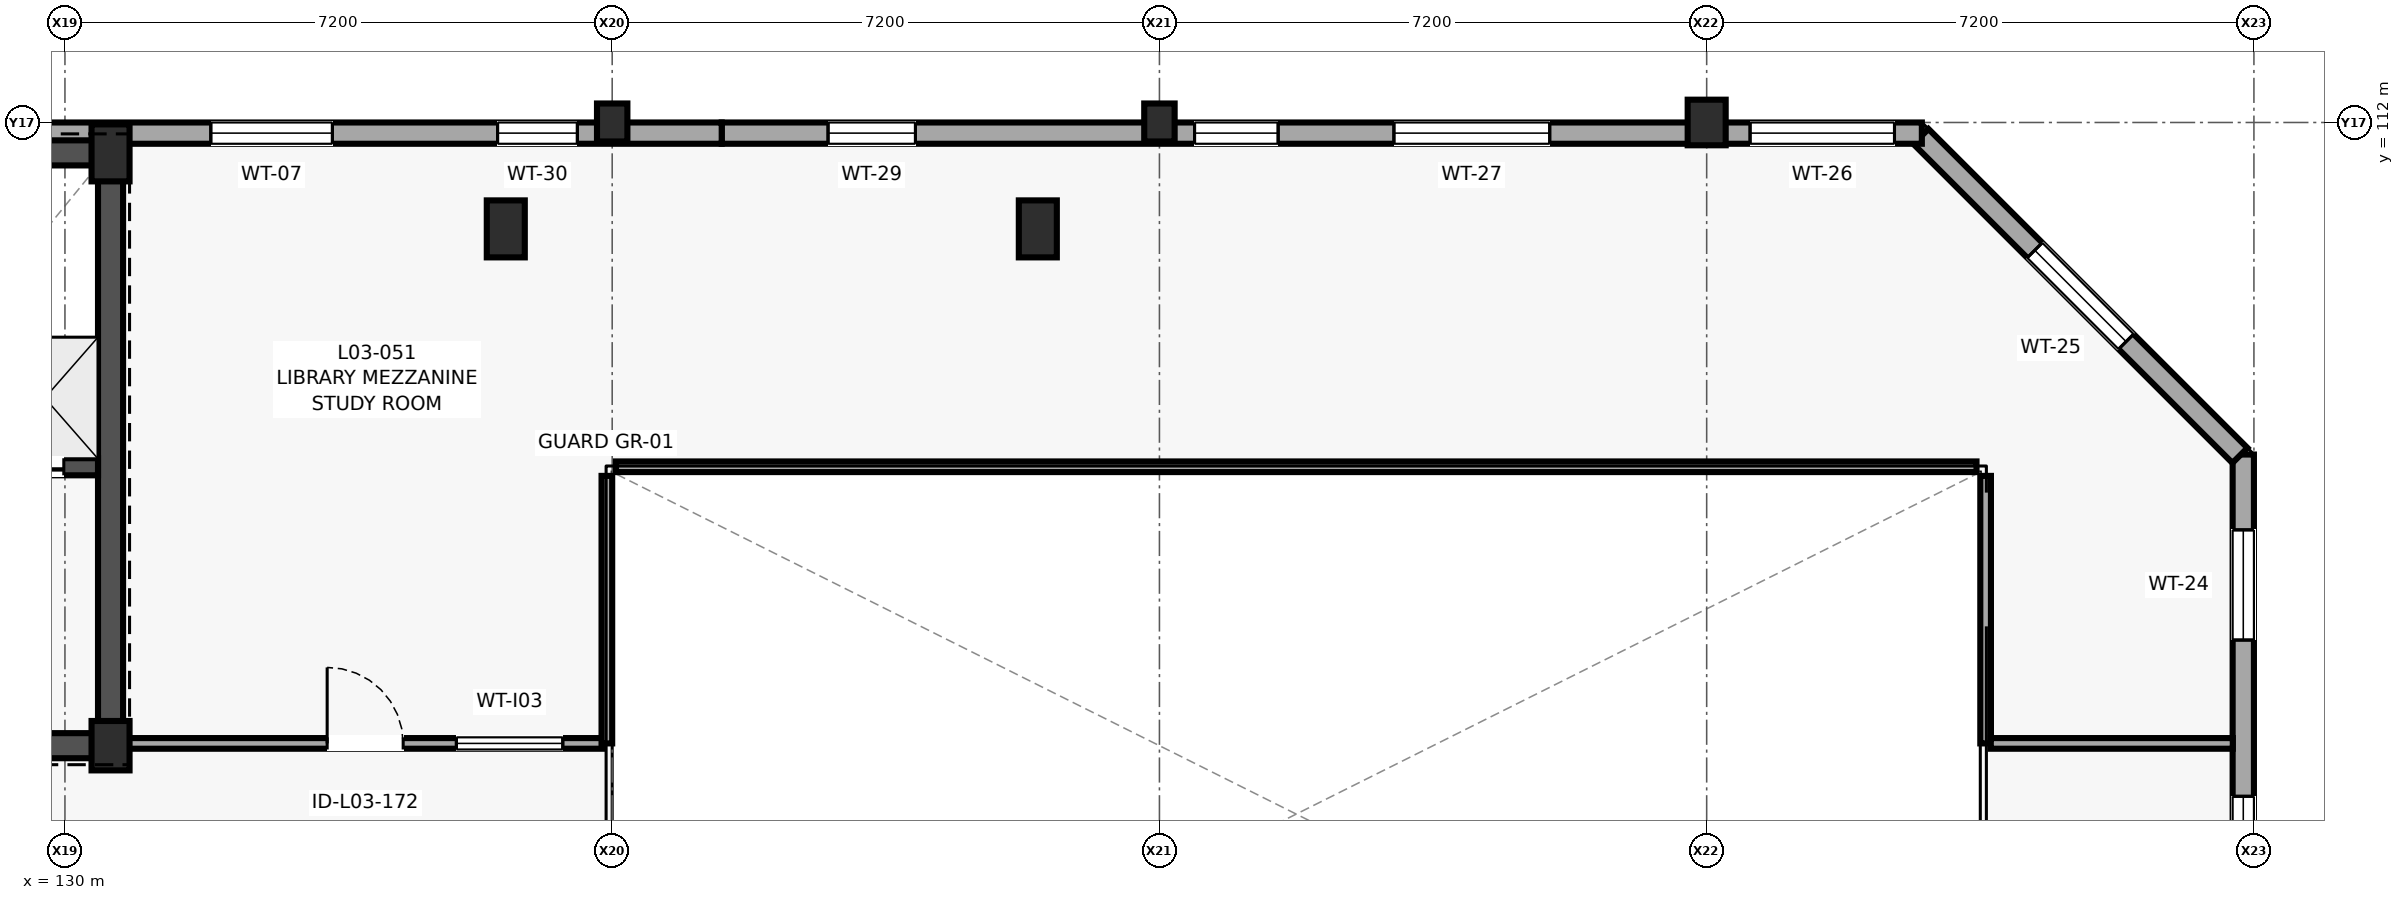
"""IFC4 building model, lengths in metres.
Left out: names, types, materials, properties, quantities, classifications, styles, units other than length and angle.
Written with IfcOpenShell. Run it as: python <this file> out.ifc"""

import sys

from ifc_helpers import new_model, si_unit, direction, frame, frame_2d, origin, origin_2d, place, context, subcontext, project, spatial, rectangle, extrude, element, fill, save


model = new_model("IFC4")
c1 = context("Model", 3, precision=1e-05, world=origin(), true_north=direction((0.0, 1.0)))
c2 = subcontext(c1, "Body", "Model", "MODEL_VIEW")
j1 = project(units=[si_unit("LENGTHUNIT", "METRE"), si_unit("PLANEANGLEUNIT", "RADIAN")], contexts=[c1])
p1 = place(None, origin())
s1 = spatial("IfcSite", under=j1, at=p1, CompositionType="ELEMENT")
p2 = place(p1, origin())
s2 = spatial("IfcBuilding", under=s1, at=p2, CompositionType="ELEMENT")
p3 = place(p2, frame((0.0, 0.0, 12.2)))
s3 = spatial("IfcBuildingStorey", under=s2, at=p3, CompositionType="ELEMENT", Elevation=12.2)
p4 = place(p3, frame((130.6, 103.8, 0.0), z_axis=(0.0, 0.0, 1.0), x_axis=(1.0, 0.0, 0.0)))
e1 = element("IfcColumn", 1, at=p4, inside=s3, PredefinedType="COLUMN", context=c2, shape_type="SweptSolid", body=[
    extrude(rectangle(XDim=0.5, YDim=0.65, at=origin_2d()), origin(), (0.0, 0.0, 1.0), 4.0),
])
for number, where, z_axis, x_axis in (
    (2, (130.6, 111.6, 0.0), (0.0, 0.0, 1.0), (1.0, 0.0, 0.0)),
    (3, (135.8, 110.6, 0.0), (0.0, 0.0, 1.0), (1.0, 0.0, 0.0)),
):
    element("IfcColumn", number, at=place(p3, frame(where, z_axis=z_axis, x_axis=x_axis)), inside=s3, PredefinedType="COLUMN", context=c2, shape_type="SweptSolid", body=[
        extrude(rectangle(XDim=0.5, YDim=0.75, at=origin_2d()), origin(), (0.0, 0.0, 1.0), 4.0),
    ])
p5 = place(p3, frame((137.2, 112.0, 0.0), z_axis=(0.0, 0.0, 1.0), x_axis=(1.0, 0.0, 0.0)))
e4 = element("IfcColumn", 4, at=p5, inside=s3, PredefinedType="PILASTER", context=c2, shape_type="SweptSolid", body=[
    extrude(rectangle(XDim=0.4, YDim=0.5, at=origin_2d()), origin(), (0.0, 0.0, 1.0), 4.0),
])
p6 = place(p3, frame((142.8, 110.6, 0.0), z_axis=(0.0, 0.0, 1.0), x_axis=(1.0, 0.0, 0.0)))
e5 = element("IfcColumn", 5, at=p6, inside=s3, PredefinedType="COLUMN", context=c2, shape_type="SweptSolid", body=[
    extrude(rectangle(XDim=0.5, YDim=0.75, at=origin_2d()), origin(), (0.0, 0.0, 1.0), 4.0),
])
p7 = place(p3, frame((144.4, 112.0, 0.0), z_axis=(0.0, 0.0, 1.0), x_axis=(1.0, 0.0, 0.0)))
e6 = element("IfcColumn", 6, at=p7, inside=s3, PredefinedType="PILASTER", context=c2, shape_type="SweptSolid", body=[
    extrude(rectangle(XDim=0.4, YDim=0.5, at=origin_2d()), origin(), (0.0, 0.0, 1.0), 4.0),
])
p8 = place(p3, frame((151.6, 112.0, 0.0), z_axis=(0.0, 0.0, 1.0), x_axis=(1.0, 0.0, 0.0)))
e7 = element("IfcColumn", 7, at=p8, inside=s3, PredefinedType="PILASTER", context=c2, shape_type="SweptSolid", body=[
    extrude(rectangle(XDim=0.5, YDim=0.6, at=origin_2d()), origin(), (0.0, 0.0, 1.0), 4.0),
])
p9 = place(p3, frame((158.66, 100.769, 0.0), z_axis=(0.0, 0.0, 1.0), x_axis=(0.0, 1.0, 0.0)))
e8 = element("IfcWall", 8, at=p9, inside=s3, PredefinedType="SOLIDWALL", context=c2, shape_type="SweptSolid", body=[
    extrude(rectangle(XDim=6.862, YDim=0.28, at=frame_2d((3.431, 0.0))), origin(), (0.0, 0.0, 1.0), 3.78),
])
p10 = place(p9, frame((1.065, 0.0, 1.05)))
e9 = element("IfcOpeningElement", 9, at=p10, cuts=e8, PredefinedType="OPENING", context=c2, shape_type="SweptSolid", body=[
    extrude(rectangle(XDim=1.3, YDim=1.6, at=frame_2d((0.65, 0.8))), frame((0.0, 0.15, 0.0), z_axis=(0.0, -1.0, 0.0), x_axis=(1.0, 0.0, 0.0)), (0.0, 0.0, 1.0), 0.3),
])
p11 = place(p9, frame((4.421, 0.0, 0.85)))
e10 = element("IfcOpeningElement", 10, at=p11, cuts=e8, PredefinedType="OPENING", context=c2, shape_type="SweptSolid", body=[
    extrude(rectangle(XDim=1.45, YDim=1.7, at=frame_2d((0.725, 0.85))), frame((0.0, 0.15, 0.0), z_axis=(0.0, -1.0, 0.0), x_axis=(1.0, 0.0, 0.0)), (0.0, 0.0, 1.0), 0.3),
])
p12 = place(p3, frame((158.616, 107.619, 0.0), z_axis=(0.0, 0.0, 1.0), x_axis=(-0.707106781187, 0.707106781187, 0.0)))
e11 = element("IfcWall", 11, at=p12, inside=s3, PredefinedType="SOLIDWALL", context=c2, shape_type="SweptSolid", body=[
    extrude(rectangle(XDim=5.936, YDim=0.28, at=frame_2d((2.968, 0.0))), origin(), (0.0, 0.0, 1.0), 3.78),
])
p13 = place(p12, frame((2.118, 0.0, 0.85)))
e12 = element("IfcOpeningElement", 12, at=p13, cuts=e11, PredefinedType="OPENING", context=c2, shape_type="SweptSolid", body=[
    extrude(rectangle(XDim=1.7, YDim=1.75, at=frame_2d((0.85, 0.875))), frame((0.0, 0.15, 0.0), z_axis=(0.0, -1.0, 0.0), x_axis=(1.0, 0.0, 0.0)), (0.0, 0.0, 1.0), 0.3),
])
p14 = place(p3, frame((154.431, 111.86, 0.0), z_axis=(0.0, 0.0, 1.0), x_axis=(-1.0, 0.0, 0.0)))
e13 = element("IfcWall", 13, at=p14, inside=s3, PredefinedType="SOLIDWALL", context=c2, shape_type="SweptSolid", body=[
    extrude(rectangle(XDim=15.79, YDim=0.28, at=frame_2d((7.895, 0.0))), origin(), (0.0, 0.0, 1.0), 3.01),
])
p15 = place(p14, frame((0.36, 0.0, 0.85)))
e14 = element("IfcOpeningElement", 14, at=p15, cuts=e13, PredefinedType="OPENING", context=c2, shape_type="SweptSolid", body=[
    extrude(rectangle(XDim=1.9, YDim=1.65, at=frame_2d((0.95, 0.825))), frame((0.0, 0.15, 0.0), z_axis=(0.0, -1.0, 0.0), x_axis=(1.0, 0.0, 0.0)), (0.0, 0.0, 1.0), 0.3),
])
p16 = place(p14, frame((4.896, 0.0, 1.05)))
e15 = element("IfcOpeningElement", 15, at=p16, cuts=e13, PredefinedType="OPENING", context=c2, shape_type="SweptSolid", body=[
    extrude(rectangle(XDim=2.05, YDim=1.55, at=frame_2d((1.025, 0.775))), frame((0.0, 0.15, 0.0), z_axis=(0.0, -1.0, 0.0), x_axis=(1.0, 0.0, 0.0)), (0.0, 0.0, 1.0), 0.3),
])
p17 = place(p14, frame((8.469, 0.0, 0.75)))
e16 = element("IfcOpeningElement", 16, at=p17, cuts=e13, PredefinedType="OPENING", context=c2, shape_type="SweptSolid", body=[
    extrude(rectangle(XDim=1.1, YDim=2.1, at=frame_2d((0.55, 1.05))), frame((0.0, 0.15, 0.0), z_axis=(0.0, -1.0, 0.0), x_axis=(1.0, 0.0, 0.0)), (0.0, 0.0, 1.0), 0.3),
])
p18 = place(p14, frame((13.241, 0.0, 1.05)))
e17 = element("IfcOpeningElement", 17, at=p18, cuts=e13, PredefinedType="OPENING", context=c2, shape_type="SweptSolid", body=[
    extrude(rectangle(XDim=1.15, YDim=1.4, at=frame_2d((0.575, 0.7))), frame((0.0, 0.15, 0.0), z_axis=(0.0, -1.0, 0.0), x_axis=(1.0, 0.0, 0.0)), (0.0, 0.0, 1.0), 0.3),
])
p19 = place(p3, frame((138.641, 111.86, 0.0), z_axis=(0.0, 0.0, 1.0), x_axis=(-1.0, 0.0, 0.0)))
e18 = element("IfcWall", 18, at=p19, inside=s3, PredefinedType="SOLIDWALL", context=c2, shape_type="SweptSolid", body=[
    extrude(rectangle(XDim=15.791, YDim=0.28, at=frame_2d((7.896, 0.0))), origin(), (0.0, 0.0, 1.0), 3.115),
])
p20 = place(p19, frame((1.899, 0.0, 1.05)))
e19 = element("IfcOpeningElement", 19, at=p20, cuts=e18, PredefinedType="OPENING", context=c2, shape_type="SweptSolid", body=[
    extrude(rectangle(XDim=1.05, YDim=1.3, at=frame_2d((0.525, 0.65))), frame((0.0, 0.15, 0.0), z_axis=(0.0, -1.0, 0.0), x_axis=(1.0, 0.0, 0.0)), (0.0, 0.0, 1.0), 0.3),
])
p21 = place(p19, frame((5.122, 0.0, 1.05)))
e20 = element("IfcOpeningElement", 20, at=p21, cuts=e18, PredefinedType="OPENING", context=c2, shape_type="SweptSolid", body=[
    extrude(rectangle(XDim=1.6, YDim=1.35, at=frame_2d((0.8, 0.675))), frame((0.0, 0.15, 0.0), z_axis=(0.0, -1.0, 0.0), x_axis=(1.0, 0.0, 0.0)), (0.0, 0.0, 1.0), 0.3),
])
p22 = place(p3, frame((123.235, 103.8, 0.0), z_axis=(0.0, 0.0, 1.0), x_axis=(1.0, 0.0, 0.0)))
e21 = element("IfcWall", 21, at=p22, inside=s3, PredefinedType="SHEAR", context=c2, shape_type="SweptSolid", body=[
    extrude(rectangle(XDim=7.53, YDim=0.33, at=frame_2d((3.765, 0.0))), origin(), (0.0, 0.0, 1.0), 3.78),
])
p23 = place(p22, frame((5.015, 0.0, 0.0)))
e22 = element("IfcOpeningElement", 22, at=p23, cuts=e21, PredefinedType="OPENING", context=c2, shape_type="SweptSolid", body=[
    extrude(rectangle(XDim=1.05, YDim=2.15, at=frame_2d((0.525, 1.075))), frame((0.0, 0.175, 0.0), z_axis=(0.0, -1.0, 0.0), x_axis=(1.0, 0.0, 0.0)), (0.0, 0.0, 1.0), 0.35),
])
p24 = place(p22, frame((1.565, 0.0, 0.0)))
e23 = element("IfcOpeningElement", 23, at=p24, cuts=e21, PredefinedType="OPENING", context=c2, shape_type="SweptSolid", body=[
    extrude(rectangle(XDim=1.1, YDim=2.15, at=frame_2d((0.55, 1.075))), frame((0.0, 0.175, 0.0), z_axis=(0.0, -1.0, 0.0), x_axis=(1.0, 0.0, 0.0)), (0.0, 0.0, 1.0), 0.35),
])
p25 = place(p3, frame((123.235, 111.6, 0.0), z_axis=(0.0, 0.0, 1.0), x_axis=(1.0, 0.0, 0.0)))
e24 = element("IfcWall", 24, at=p25, inside=s3, PredefinedType="SHEAR", context=c2, shape_type="SweptSolid", body=[
    extrude(rectangle(XDim=7.53, YDim=0.33, at=frame_2d((3.765, 0.0))), origin(), (0.0, 0.0, 1.0), 3.78),
])
p26 = place(p3, frame((130.6, 103.965, 0.0), z_axis=(0.0, 0.0, 1.0), x_axis=(0.0, 1.0, 0.0)))
e25 = element("IfcWall", 25, at=p26, inside=s3, PredefinedType="SHEAR", context=c2, shape_type="SweptSolid", body=[
    extrude(rectangle(XDim=7.47, YDim=0.33, at=frame_2d((3.735, 0.0))), origin(), (0.0, 0.0, 1.0), 3.78),
])
p27 = place(p3, frame((127.285, 107.47, 0.0), z_axis=(0.0, 0.0, 1.0), x_axis=(1.0, 0.0, 0.0)))
e26 = element("IfcWall", 26, at=p27, inside=s3, PredefinedType="SHEAR", context=c2, shape_type="SweptSolid", body=[
    extrude(rectangle(XDim=3.15, YDim=0.225, at=frame_2d((1.575, 0.0))), origin(), (0.0, 0.0, 1.0), 3.78),
])
p28 = place(p27, frame((0.2, 0.0, 0.0)))
e27 = element("IfcOpeningElement", 27, at=p28, cuts=e26, PredefinedType="OPENING", context=c2, shape_type="SweptSolid", body=[
    extrude(rectangle(XDim=0.95, YDim=2.15, at=frame_2d((0.475, 1.075))), frame((0.0, 0.123, 0.0), z_axis=(0.0, -1.0, 0.0), x_axis=(1.0, 0.0, 0.0)), (0.0, 0.0, 1.0), 0.245),
])
p29 = place(p27, frame((1.65, 0.0, 0.0)))
e28 = element("IfcOpeningElement", 28, at=p29, cuts=e26, PredefinedType="OPENING", context=c2, shape_type="SweptSolid", body=[
    extrude(rectangle(XDim=1.05, YDim=2.2, at=frame_2d((0.525, 1.1))), frame((0.0, 0.123, 0.0), z_axis=(0.0, -1.0, 0.0), x_axis=(1.0, 0.0, 0.0)), (0.0, 0.0, 1.0), 0.245),
])
p30 = place(p3, frame((155.27, 107.35, 0.0), z_axis=(0.0, 0.0, 1.0), x_axis=(0.0, -1.0, 0.0)))
e29 = element("IfcWall", 29, at=p30, inside=s3, PredefinedType="PARTITIONING", context=c2, shape_type="SweptSolid", body=[
    extrude(rectangle(XDim=3.52, YDim=0.14, at=frame_2d((1.76, 0.0))), origin(), (0.0, 0.0, 1.0), 3.715),
])
p31 = place(p3, frame((155.338, 103.83, 0.0), z_axis=(0.0, 0.0, 1.0), x_axis=(1.0, 0.0, 0.0)))
e30 = element("IfcWall", 30, at=p31, inside=s3, PredefinedType="PARTITIONING", context=c2, shape_type="SweptSolid", body=[
    extrude(rectangle(XDim=3.184, YDim=0.14, at=frame_2d((1.592, 0.0))), origin(), (0.0, 0.0, 1.0), 3.715),
])
p32 = place(p3, frame((130.83, 103.83, 0.0), z_axis=(0.0, 0.0, 1.0), x_axis=(1.0, 0.0, 0.0)))
e31 = element("IfcWall", 31, at=p32, inside=s3, PredefinedType="PARTITIONING", context=c2, shape_type="SweptSolid", body=[
    extrude(rectangle(XDim=6.24, YDim=0.14, at=frame_2d((3.12, 0.0))), origin(), (0.0, 0.0, 1.0), 3.715),
])
p33 = place(p32, frame((2.62, 0.0, 0.0)))
e32 = element("IfcOpeningElement", 32, at=p33, cuts=e31, PredefinedType="OPENING", context=c2, shape_type="SweptSolid", body=[
    extrude(rectangle(XDim=1.0, YDim=2.1, at=frame_2d((0.5, 1.05))), frame((0.0, 0.08, 0.0), z_axis=(0.0, -1.0, 0.0), x_axis=(1.0, 0.0, 0.0)), (0.0, 0.0, 1.0), 0.16),
])
p34 = place(p32, frame((4.32, 0.0, 1.05)))
e33 = element("IfcOpeningElement", 33, at=p34, cuts=e31, PredefinedType="OPENING", context=c2, shape_type="SweptSolid", body=[
    extrude(rectangle(XDim=1.4, YDim=1.05, at=frame_2d((0.7, 0.525))), frame((0.0, 0.08, 0.0), z_axis=(0.0, -1.0, 0.0), x_axis=(1.0, 0.0, 0.0)), (0.0, 0.0, 1.0), 0.16),
])
p35 = place(p3, frame((137.13, 103.83, 0.0), z_axis=(0.0, 0.0, 1.0), x_axis=(0.0, 1.0, 0.0)))
e34 = element("IfcWall", 34, at=p35, inside=s3, PredefinedType="PARTITIONING", context=c2, shape_type="SweptSolid", body=[
    extrude(rectangle(XDim=3.52, YDim=0.14, at=frame_2d((1.76, 0.0))), origin(), (0.0, 0.0, 1.0), 3.165),
])
p36 = place(p3, frame((137.25, 107.47, 0.0), z_axis=(0.0, 0.0, 1.0), x_axis=(1.0, 0.0, 0.0)))
e35 = element("IfcWall", 35, at=p36, inside=s3, PredefinedType="PARTITIONING", context=c2, shape_type="SweptSolid", body=[
    extrude(rectangle(XDim=17.9, YDim=0.14, at=frame_2d((8.95, 0.0))), origin(), (0.0, 0.0, 1.0), 3.715),
])
p37 = place(p10, origin())
e36 = element("IfcWindow", 36, at=p37, inside=s3, PartitioningType="SINGLE_PANEL", PredefinedType="WINDOW", context=c2, shape_type="SweptSolid", body=[
    extrude(rectangle(XDim=1.3, YDim=1.6, at=frame_2d((0.65, 0.8))), frame((0.0, 0.03, 0.0), z_axis=(0.0, -1.0, 0.0), x_axis=(1.0, 0.0, 0.0)), (0.0, 0.0, 1.0), 0.06),
])
fill(e9, e36)
p38 = place(p11, origin())
e37 = element("IfcWindow", 37, at=p38, inside=s3, PartitioningType="SINGLE_PANEL", PredefinedType="WINDOW", context=c2, shape_type="SweptSolid", body=[
    extrude(rectangle(XDim=1.45, YDim=1.7, at=frame_2d((0.725, 0.85))), frame((0.0, 0.03, 0.0), z_axis=(0.0, -1.0, 0.0), x_axis=(1.0, 0.0, 0.0)), (0.0, 0.0, 1.0), 0.06),
])
fill(e10, e37)
p39 = place(p13, origin())
e38 = element("IfcWindow", 38, at=p39, inside=s3, PartitioningType="SINGLE_PANEL", PredefinedType="WINDOW", context=c2, shape_type="SweptSolid", body=[
    extrude(rectangle(XDim=1.7, YDim=1.75, at=frame_2d((0.85, 0.875))), frame((0.0, 0.03, 0.0), z_axis=(0.0, -1.0, 0.0), x_axis=(1.0, 0.0, 0.0)), (0.0, 0.0, 1.0), 0.06),
])
fill(e12, e38)
p40 = place(p15, origin())
e39 = element("IfcWindow", 39, at=p40, inside=s3, PartitioningType="SINGLE_PANEL", PredefinedType="WINDOW", context=c2, shape_type="SweptSolid", body=[
    extrude(rectangle(XDim=1.9, YDim=1.65, at=frame_2d((0.95, 0.825))), frame((0.0, 0.03, 0.0), z_axis=(0.0, -1.0, 0.0), x_axis=(1.0, 0.0, 0.0)), (0.0, 0.0, 1.0), 0.06),
])
fill(e14, e39)
p41 = place(p16, origin())
e40 = element("IfcWindow", 40, at=p41, inside=s3, PartitioningType="SINGLE_PANEL", PredefinedType="WINDOW", context=c2, shape_type="SweptSolid", body=[
    extrude(rectangle(XDim=2.05, YDim=1.55, at=frame_2d((1.025, 0.775))), frame((0.0, 0.03, 0.0), z_axis=(0.0, -1.0, 0.0), x_axis=(1.0, 0.0, 0.0)), (0.0, 0.0, 1.0), 0.06),
])
fill(e15, e40)
p42 = place(p17, origin())
e41 = element("IfcWindow", 41, at=p42, inside=s3, PartitioningType="SINGLE_PANEL", PredefinedType="WINDOW", context=c2, shape_type="SweptSolid", body=[
    extrude(rectangle(XDim=1.1, YDim=2.1, at=frame_2d((0.55, 1.05))), frame((0.0, 0.03, 0.0), z_axis=(0.0, -1.0, 0.0), x_axis=(1.0, 0.0, 0.0)), (0.0, 0.0, 1.0), 0.06),
])
fill(e16, e41)
p43 = place(p18, origin())
e42 = element("IfcWindow", 42, at=p43, inside=s3, PartitioningType="SINGLE_PANEL", PredefinedType="WINDOW", context=c2, shape_type="SweptSolid", body=[
    extrude(rectangle(XDim=1.15, YDim=1.4, at=frame_2d((0.575, 0.7))), frame((0.0, 0.03, 0.0), z_axis=(0.0, -1.0, 0.0), x_axis=(1.0, 0.0, 0.0)), (0.0, 0.0, 1.0), 0.06),
])
fill(e17, e42)
p44 = place(p20, origin())
e43 = element("IfcWindow", 43, at=p44, inside=s3, PartitioningType="SINGLE_PANEL", PredefinedType="WINDOW", context=c2, shape_type="SweptSolid", body=[
    extrude(rectangle(XDim=1.05, YDim=1.3, at=frame_2d((0.525, 0.65))), frame((0.0, 0.03, 0.0), z_axis=(0.0, -1.0, 0.0), x_axis=(1.0, 0.0, 0.0)), (0.0, 0.0, 1.0), 0.06),
])
fill(e19, e43)
p45 = place(p21, origin())
e44 = element("IfcWindow", 44, at=p45, inside=s3, PartitioningType="SINGLE_PANEL", PredefinedType="WINDOW", context=c2, shape_type="SweptSolid", body=[
    extrude(rectangle(XDim=1.6, YDim=1.35, at=frame_2d((0.8, 0.675))), frame((0.0, 0.03, 0.0), z_axis=(0.0, -1.0, 0.0), x_axis=(1.0, 0.0, 0.0)), (0.0, 0.0, 1.0), 0.06),
])
fill(e20, e44)
p46 = place(p29, origin())
e45 = element("IfcDoor", 45, at=p46, inside=s3, OperationType="SLIDING_TO_RIGHT", PredefinedType="DOOR", context=c2, shape_type="SweptSolid", body=[
    extrude(rectangle(XDim=1.05, YDim=2.2, at=frame_2d((0.525, 1.1))), frame((0.0, 0.025, 0.0), z_axis=(0.0, -1.0, 0.0), x_axis=(1.0, 0.0, 0.0)), (0.0, 0.0, 1.0), 0.05),
])
fill(e28, e45)
p47 = place(p33, origin())
e46 = element("IfcDoor", 46, at=p47, inside=s3, OperationType="SINGLE_SWING_LEFT", PredefinedType="DOOR", context=c2, shape_type="SweptSolid", body=[
    extrude(rectangle(XDim=1.0, YDim=2.1, at=frame_2d((0.5, 1.05))), frame((0.0, 0.025, 0.0), z_axis=(0.0, -1.0, 0.0), x_axis=(1.0, 0.0, 0.0)), (0.0, 0.0, 1.0), 0.05),
])
fill(e32, e46)
p48 = place(p34, origin())
e47 = element("IfcWindow", 47, at=p48, inside=s3, PartitioningType="SINGLE_PANEL", PredefinedType="WINDOW", context=c2, shape_type="SweptSolid", body=[
    extrude(rectangle(XDim=1.4, YDim=1.05, at=frame_2d((0.7, 0.525))), frame((0.0, 0.03, 0.0), z_axis=(0.0, -1.0, 0.0), x_axis=(1.0, 0.0, 0.0)), (0.0, 0.0, 1.0), 0.06),
])
fill(e33, e47)
save(model, sys.argv[1])
